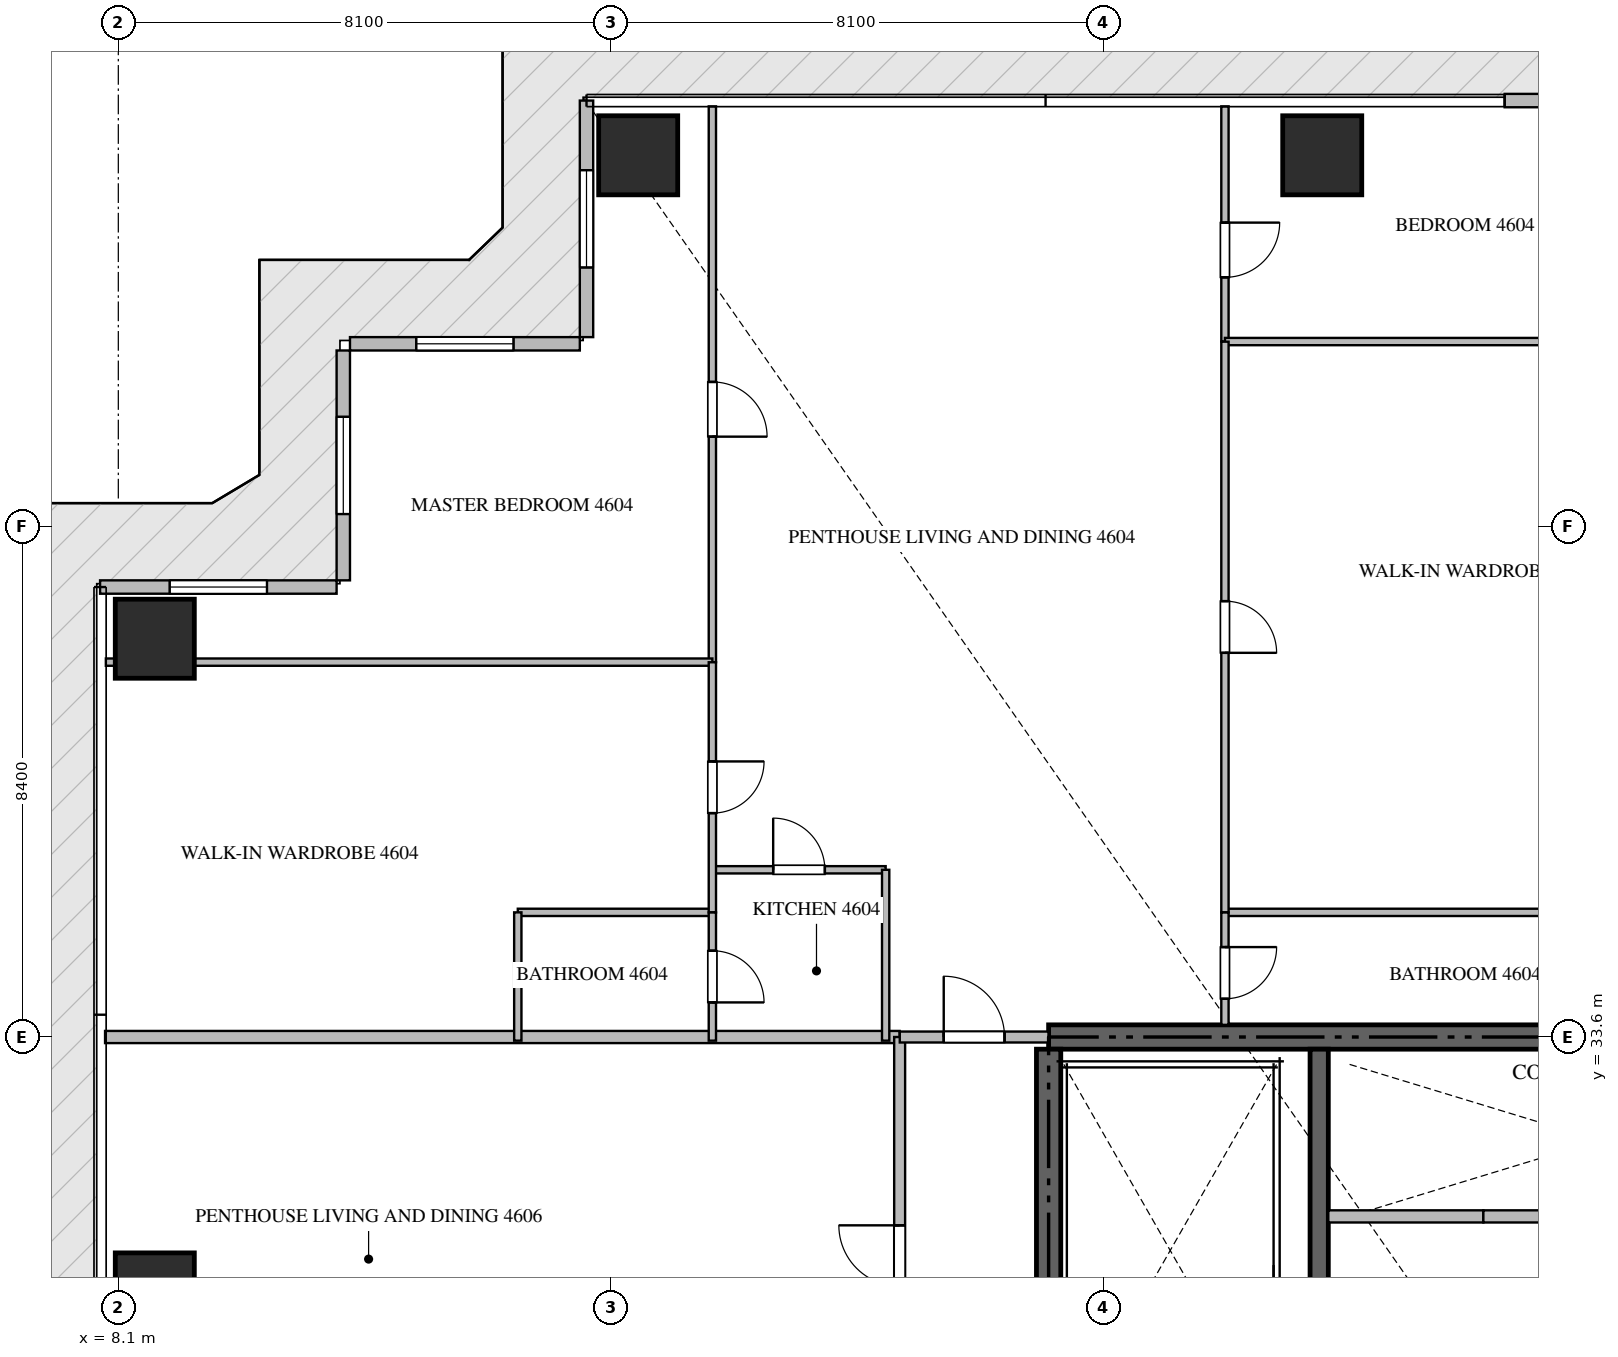
"""IFC4 building model, lengths in metres.
Left out: names, types, materials, properties, quantities, classifications, styles, units other than length and angle.
Written with IfcOpenShell. Run it as: python <this file> out.ifc"""

import sys

from ifc_helpers import new_model, si_unit, direction, frame, frame_2d, origin, origin_2d, place, context, subcontext, project, spatial, rectangle, extrude, source, transform, mapped, element, fill, save


model = new_model("IFC4")
c1 = context("Model", 3, precision=1e-05, world=origin(), true_north=direction((0.0, 1.0)))
c2 = subcontext(c1, "Body", "Model", "MODEL_VIEW")
j1 = project(units=[si_unit("LENGTHUNIT", "METRE"), si_unit("PLANEANGLEUNIT", "RADIAN")], contexts=[c1])
p1 = place(None, origin())
s1 = spatial("IfcSite", under=j1, at=p1, CompositionType="ELEMENT")
p2 = place(p1, origin())
s2 = spatial("IfcBuilding", under=s1, at=p2, CompositionType="ELEMENT")
p3 = place(p2, frame((0.0, 0.0, 183.9)))
s3 = spatial("IfcBuildingStorey", under=s2, at=p3, CompositionType="ELEMENT", Elevation=183.9)
p4 = place(p3, frame((41.4, 33.6, -0.26), z_axis=(0.0, 0.0, 1.0), x_axis=(-1.0, 0.0, 0.0)))
e1 = element("IfcWall", 1, at=p4, inside=s3, PredefinedType="SHEAR", context=c2, shape_type="SweptSolid", body=[
    extrude(rectangle(XDim=18.0, YDim=0.4, at=frame_2d((9.0, 0.0))), origin(), (0.0, 0.0, 1.0), 3.748),
])
p5 = place(p3, frame((23.4, 24.25, -0.26), z_axis=(0.0, 0.0, 1.0), x_axis=(0.0, 1.0, 0.0)))
e2 = element("IfcWall", 2, at=p5, inside=s3, PredefinedType="SHEAR", context=c2, shape_type="SweptSolid", body=[
    extrude(rectangle(XDim=9.15, YDim=0.4, at=frame_2d((4.575, 0.0))), origin(), (0.0, 0.0, 1.0), 3.748),
])
p6 = place(p3, frame((27.85, 23.55, -0.26), z_axis=(0.0, 0.0, 1.0), x_axis=(0.0, 1.0, 0.0)))
e3 = element("IfcWall", 3, at=p6, inside=s3, PredefinedType="SHEAR", context=c2, shape_type="SweptSolid", body=[
    extrude(rectangle(XDim=9.85, YDim=0.3, at=frame_2d((4.925, 0.0))), origin(), (0.0, 0.0, 1.0), 3.748),
])
m1 = source(origin(), c2, "Body", "SweptSolid", [
    extrude(rectangle(XDim=1.3, YDim=1.3, at=origin_2d()), origin(), (0.0, 0.0, 1.0), 3.75),
])
for number, where, z_axis, x_axis in (
    (4, (16.65, 48.1, -0.26), (0.0, 0.0, 1.0), (1.0, 0.0, 0.0)),
    (5, (27.9, 48.1, -0.26), (0.0, 0.0, 1.0), (1.0, 0.0, 0.0)),
    (6, (8.7, 29.4, -0.26), (0.0, 0.0, 1.0), (1.0, 0.0, 0.0)),
    (7, (8.7, 40.15, -0.26), (0.0, 0.0, 1.0), (1.0, 0.0, 0.0)),
):
    element("IfcColumn", number, at=place(p3, frame(where, z_axis=z_axis, x_axis=x_axis)), inside=s3, PredefinedType="COLUMN", context=c2, shape_type="MappedRepresentation", body=[
        mapped(m1, transform((0.0, 0.0, 0.0), scale=1.0)),
    ])
p7 = place(p3, frame((33.9, 49.0, 0.0), z_axis=(0.0, 0.0, 1.0), x_axis=(-1.0, 0.0, 0.0)))
e8 = element("IfcWall", 8, at=p7, inside=s3, PredefinedType="ELEMENTEDWALL", context=c2, shape_type="SweptSolid", body=[
    extrude(rectangle(XDim=3.0, YDim=0.22, at=frame_2d((1.5, 0.0))), origin(), (0.0, 0.0, 1.0), 3.475),
])
p8 = place(p7, frame((0.95, 0.0, 0.0)))
e9 = element("IfcOpeningElement", 9, at=p8, cuts=e8, PredefinedType="OPENING", context=c2, shape_type="SweptSolid", body=[
    extrude(rectangle(XDim=1.1, YDim=2.2, at=frame_2d((0.55, 1.1))), frame((0.0, 0.12, 0.0), z_axis=(0.0, -1.0, 0.0), x_axis=(1.0, 0.0, 0.0)), (0.0, 0.0, 1.0), 0.24),
])
p9 = place(p3, frame((15.8, 49.0, 0.0), z_axis=(0.0, 0.0, 1.0), x_axis=(0.0, -1.0, 0.0)))
e10 = element("IfcWall", 10, at=p9, inside=s3, PredefinedType="ELEMENTEDWALL", context=c2, shape_type="SweptSolid", body=[
    extrude(rectangle(XDim=3.89, YDim=0.22, at=frame_2d((1.945, 0.0))), origin(), (0.0, 0.0, 1.0), 3.475),
])
p10 = place(p9, frame((1.145, 0.0, 0.65)))
e11 = element("IfcOpeningElement", 11, at=p10, cuts=e10, PredefinedType="OPENING", context=c2, shape_type="SweptSolid", body=[
    extrude(rectangle(XDim=1.6, YDim=2.1, at=frame_2d((0.8, 1.05))), frame((0.0, 0.12, 0.0), z_axis=(0.0, -1.0, 0.0), x_axis=(1.0, 0.0, 0.0)), (0.0, 0.0, 1.0), 0.24),
])
p11 = place(p3, frame((15.69, 45.0, 0.0), z_axis=(0.0, 0.0, 1.0), x_axis=(-1.0, 0.0, 0.0)))
e12 = element("IfcWall", 12, at=p11, inside=s3, PredefinedType="ELEMENTEDWALL", context=c2, shape_type="SweptSolid", body=[
    extrude(rectangle(XDim=3.78, YDim=0.22, at=frame_2d((1.89, 0.0))), origin(), (0.0, 0.0, 1.0), 3.475),
])
p12 = place(p11, frame((1.09, 0.0, 0.65)))
e13 = element("IfcOpeningElement", 13, at=p12, cuts=e12, PredefinedType="OPENING", context=c2, shape_type="SweptSolid", body=[
    extrude(rectangle(XDim=1.6, YDim=2.1, at=frame_2d((0.8, 1.05))), frame((0.0, 0.12, 0.0), z_axis=(0.0, -1.0, 0.0), x_axis=(1.0, 0.0, 0.0)), (0.0, 0.0, 1.0), 0.24),
])
p13 = place(p3, frame((11.8, 44.89, 0.0), z_axis=(0.0, 0.0, 1.0), x_axis=(0.0, -1.0, 0.0)))
e14 = element("IfcWall", 14, at=p13, inside=s3, PredefinedType="ELEMENTEDWALL", context=c2, shape_type="SweptSolid", body=[
    extrude(rectangle(XDim=3.78, YDim=0.22, at=frame_2d((1.89, 0.0))), origin(), (0.0, 0.0, 1.0), 3.475),
])
p14 = place(p13, frame((1.09, 0.0, 0.65)))
e15 = element("IfcOpeningElement", 15, at=p14, cuts=e14, PredefinedType="OPENING", context=c2, shape_type="SweptSolid", body=[
    extrude(rectangle(XDim=1.6, YDim=2.1, at=frame_2d((0.8, 1.05))), frame((0.0, 0.12, 0.0), z_axis=(0.0, -1.0, 0.0), x_axis=(1.0, 0.0, 0.0)), (0.0, 0.0, 1.0), 0.24),
])
p15 = place(p3, frame((11.69, 41.0, 0.0), z_axis=(0.0, 0.0, 1.0), x_axis=(-1.0, 0.0, 0.0)))
e16 = element("IfcWall", 16, at=p15, inside=s3, PredefinedType="ELEMENTEDWALL", context=c2, shape_type="SweptSolid", body=[
    extrude(rectangle(XDim=3.89, YDim=0.22, at=frame_2d((1.945, 0.0))), origin(), (0.0, 0.0, 1.0), 3.475),
])
p16 = place(p15, frame((1.145, 0.0, 0.65)))
e17 = element("IfcOpeningElement", 17, at=p16, cuts=e16, PredefinedType="OPENING", context=c2, shape_type="SweptSolid", body=[
    extrude(rectangle(XDim=1.6, YDim=2.1, at=frame_2d((0.8, 1.05))), frame((0.0, 0.12, 0.0), z_axis=(0.0, -1.0, 0.0), x_axis=(1.0, 0.0, 0.0)), (0.0, 0.0, 1.0), 0.24),
])
p17 = place(p3, frame((28.0, 30.65, 0.0), z_axis=(0.0, 0.0, 1.0), x_axis=(1.0, 0.0, 0.0)))
e18 = element("IfcWall", 18, at=p17, inside=s3, PredefinedType="STANDARD", context=c2, shape_type="SweptSolid", body=[
    extrude(rectangle(XDim=2.55, YDim=0.2, at=frame_2d((1.275, 0.0))), origin(), (0.0, 0.0, 1.0), 3.49),
])
p18 = place(p3, frame((30.55, 30.65, 0.0), z_axis=(0.0, 0.0, 1.0), x_axis=(1.0, 0.0, 0.0)))
e19 = element("IfcWall", 19, at=p18, inside=s3, PredefinedType="STANDARD", context=c2, shape_type="SweptSolid", body=[
    extrude(rectangle(XDim=2.3, YDim=0.2, at=frame_2d((1.15, 0.0))), origin(), (0.0, 0.0, 1.0), 3.49),
])
p19 = place(p3, frame((7.882, 33.6, 0.0), z_axis=(0.0, 0.0, 1.0), x_axis=(1.0, 0.0, 0.0)))
e20 = element("IfcWall", 20, at=p19, inside=s3, PredefinedType="PARTITIONING", context=c2, shape_type="SweptSolid", body=[
    extrude(rectangle(XDim=13.068, YDim=0.2, at=frame_2d((6.534, 0.0))), origin(), (0.0, 0.0, 1.0), 3.49),
])
p20 = place(p3, frame((20.95, 14.9, 0.0), z_axis=(0.0, 0.0, 1.0), x_axis=(0.0, 1.0, 0.0)))
e21 = element("IfcWall", 21, at=p20, inside=s3, PredefinedType="PARTITIONING", context=c2, shape_type="SweptSolid", body=[
    extrude(rectangle(XDim=18.7, YDim=0.18, at=frame_2d((9.35, 0.0))), origin(), (0.0, 0.0, 1.0), 3.49),
])
p21 = place(p20, frame((14.603, 0.0, 0.0)))
e22 = element("IfcOpeningElement", 22, at=p21, cuts=e21, PredefinedType="OPENING", context=c2, shape_type="SweptSolid", body=[
    extrude(rectangle(XDim=1.0, YDim=2.15, at=frame_2d((0.5, 1.075))), frame((0.0, 0.1, 0.0), z_axis=(0.0, -1.0, 0.0), x_axis=(1.0, 0.0, 0.0)), (0.0, 0.0, 1.0), 0.2),
])
p22 = place(p3, frame((20.952, 33.6, 0.0), z_axis=(0.0, 0.0, 1.0), x_axis=(1.0, 0.0, 0.0)))
e23 = element("IfcWall", 23, at=p22, inside=s3, PredefinedType="PARTITIONING", context=c2, shape_type="SweptSolid", body=[
    extrude(rectangle(XDim=2.446, YDim=0.18, at=frame_2d((1.223, 0.0))), origin(), (0.0, 0.0, 1.0), 3.49),
])
p23 = place(p22, frame((0.723, 0.0, 0.0)))
e24 = element("IfcOpeningElement", 24, at=p23, cuts=e23, PredefinedType="OPENING", context=c2, shape_type="SweptSolid", body=[
    extrude(rectangle(XDim=1.0, YDim=2.15, at=frame_2d((0.5, 1.075))), frame((0.0, 0.1, 0.0), z_axis=(0.0, -1.0, 0.0), x_axis=(1.0, 0.0, 0.0)), (0.0, 0.0, 1.0), 0.2),
])
p24 = place(p3, frame((17.87, 36.35, 0.0), z_axis=(0.0, 0.0, 1.0), x_axis=(1.0, 0.0, 0.0)))
e25 = element("IfcWall", 25, at=p24, inside=s3, PredefinedType="PARTITIONING", context=c2, shape_type="SweptSolid", body=[
    extrude(rectangle(XDim=2.85, YDim=0.12, at=frame_2d((1.425, 0.0))), origin(), (0.0, 0.0, 1.0), 3.49),
])
p25 = place(p24, frame((1.0, 0.0, 0.0)))
e26 = element("IfcOpeningElement", 26, at=p25, cuts=e25, PredefinedType="OPENING", context=c2, shape_type="SweptSolid", body=[
    extrude(rectangle(XDim=0.85, YDim=2.1, at=frame_2d((0.425, 1.05))), frame((0.0, 0.07, 0.0), z_axis=(0.0, -1.0, 0.0), x_axis=(1.0, 0.0, 0.0)), (0.0, 0.0, 1.0), 0.14),
])
p26 = place(p3, frame((20.72, 36.35, 0.0), z_axis=(0.0, 0.0, 1.0), x_axis=(0.0, -1.0, 0.0)))
e27 = element("IfcWall", 27, at=p26, inside=s3, PredefinedType="PARTITIONING", context=c2, shape_type="SweptSolid", body=[
    extrude(rectangle(XDim=2.81, YDim=0.12, at=frame_2d((1.405, 0.0))), origin(), (0.0, 0.0, 1.0), 3.49),
])
p27 = place(p3, frame((17.87, 48.905, 0.0), z_axis=(0.0, 0.0, 1.0), x_axis=(0.0, -1.0, 0.0)))
e28 = element("IfcWall", 28, at=p27, inside=s3, PredefinedType="PARTITIONING", context=c2, shape_type="SweptSolid", body=[
    extrude(rectangle(XDim=9.14, YDim=0.12, at=frame_2d((4.57, 0.0))), origin(), (0.0, 0.0, 1.0), 3.49),
])
p28 = place(p27, frame((4.532, 0.0, 0.0)))
e29 = element("IfcOpeningElement", 29, at=p28, cuts=e28, PredefinedType="OPENING", context=c2, shape_type="SweptSolid", body=[
    extrude(rectangle(XDim=0.9, YDim=2.1, at=frame_2d((0.45, 1.05))), frame((0.0, 0.07, 0.0), z_axis=(0.0, -1.0, 0.0), x_axis=(1.0, 0.0, 0.0)), (0.0, 0.0, 1.0), 0.14),
])
p29 = place(p3, frame((7.895, 39.765, 0.0), z_axis=(0.0, 0.0, 1.0), x_axis=(1.0, 0.0, 0.0)))
e30 = element("IfcWall", 30, at=p29, inside=s3, PredefinedType="PARTITIONING", context=c2, shape_type="SweptSolid", body=[
    extrude(rectangle(XDim=9.975, YDim=0.12, at=frame_2d((4.988, 0.0))), origin(), (0.0, 0.0, 1.0), 3.49),
])
p30 = place(p3, frame((14.67, 35.65, 0.0), z_axis=(0.0, 0.0, 1.0), x_axis=(1.0, 0.0, 0.0)))
e31 = element("IfcWall", 31, at=p30, inside=s3, PredefinedType="PARTITIONING", context=c2, shape_type="SweptSolid", body=[
    extrude(rectangle(XDim=3.2, YDim=0.12, at=frame_2d((1.6, 0.0))), origin(), (0.0, 0.0, 1.0), 3.49),
])
p31 = place(p3, frame((14.67, 35.65, 0.0), z_axis=(0.0, 0.0, 1.0), x_axis=(0.0, -1.0, 0.0)))
e32 = element("IfcWall", 32, at=p31, inside=s3, PredefinedType="PARTITIONING", context=c2, shape_type="SweptSolid", body=[
    extrude(rectangle(XDim=2.11, YDim=0.12, at=frame_2d((1.055, 0.0))), origin(), (0.0, 0.0, 1.0), 3.49),
])
p32 = place(p3, frame((17.87, 39.763, 0.0), z_axis=(0.0, 0.0, 1.0), x_axis=(0.0, -1.0, 0.0)))
e33 = element("IfcWall", 33, at=p32, inside=s3, PredefinedType="PARTITIONING", context=c2, shape_type="SweptSolid", body=[
    extrude(rectangle(XDim=4.113, YDim=0.12, at=frame_2d((2.057, 0.0))), origin(), (0.0, 0.0, 1.0), 3.49),
])
p33 = place(p32, frame((1.631, 0.0, 0.0)))
e34 = element("IfcOpeningElement", 34, at=p33, cuts=e33, PredefinedType="OPENING", context=c2, shape_type="SweptSolid", body=[
    extrude(rectangle(XDim=0.85, YDim=2.1, at=frame_2d((0.425, 1.05))), frame((0.0, 0.07, 0.0), z_axis=(0.0, -1.0, 0.0), x_axis=(1.0, 0.0, 0.0)), (0.0, 0.0, 1.0), 0.14),
])
p34 = place(p3, frame((17.87, 35.648, 0.0), z_axis=(0.0, 0.0, 1.0), x_axis=(0.0, -1.0, 0.0)))
e35 = element("IfcWall", 35, at=p34, inside=s3, PredefinedType="PARTITIONING", context=c2, shape_type="SweptSolid", body=[
    extrude(rectangle(XDim=2.108, YDim=0.12, at=frame_2d((1.054, 0.0))), origin(), (0.0, 0.0, 1.0), 3.49),
])
p35 = place(p34, frame((0.629, 0.0, 0.0)))
e36 = element("IfcOpeningElement", 36, at=p35, cuts=e35, PredefinedType="OPENING", context=c2, shape_type="SweptSolid", body=[
    extrude(rectangle(XDim=0.85, YDim=2.1, at=frame_2d((0.425, 1.05))), frame((0.0, 0.07, 0.0), z_axis=(0.0, -1.0, 0.0), x_axis=(1.0, 0.0, 0.0)), (0.0, 0.0, 1.0), 0.14),
])
p36 = place(p3, frame((26.3, 48.905, 0.0), z_axis=(0.0, 0.0, 1.0), x_axis=(0.0, -1.0, 0.0)))
e37 = element("IfcWall", 37, at=p36, inside=s3, PredefinedType="PARTITIONING", context=c2, shape_type="SweptSolid", body=[
    extrude(rectangle(XDim=3.868, YDim=0.12, at=frame_2d((1.934, 0.0))), origin(), (0.0, 0.0, 1.0), 3.49),
])
p37 = place(p36, frame((1.912, 0.0, 0.0)))
e38 = element("IfcOpeningElement", 38, at=p37, cuts=e37, PredefinedType="OPENING", context=c2, shape_type="SweptSolid", body=[
    extrude(rectangle(XDim=0.9, YDim=2.1, at=frame_2d((0.45, 1.05))), frame((0.0, 0.07, 0.0), z_axis=(0.0, -1.0, 0.0), x_axis=(1.0, 0.0, 0.0)), (0.0, 0.0, 1.0), 0.14),
])
for number, where, z_axis, x_axis in (
    (39, (26.3, 45.037, 0.0), (0.0, 0.0, 1.0), (1.0, 0.0, 0.0)),
    (40, (26.3, 35.65, 0.0), (0.0, 0.0, 1.0), (1.0, 0.0, 0.0)),
):
    element("IfcWall", number, at=place(p3, frame(where, z_axis=z_axis, x_axis=x_axis)), inside=s3, PredefinedType="PARTITIONING", context=c2, shape_type="SweptSolid", body=[
        extrude(rectangle(XDim=7.96, YDim=0.12, at=frame_2d((3.98, 0.0))), origin(), (0.0, 0.0, 1.0), 3.49),
    ])
p38 = place(p3, frame((26.3, 45.035, 0.0), z_axis=(0.0, 0.0, 1.0), x_axis=(0.0, -1.0, 0.0)))
e41 = element("IfcWall", 41, at=p38, inside=s3, PredefinedType="PARTITIONING", context=c2, shape_type="SweptSolid", body=[
    extrude(rectangle(XDim=9.385, YDim=0.12, at=frame_2d((4.692, 0.0))), origin(), (0.0, 0.0, 1.0), 3.49),
])
p39 = place(p38, frame((4.267, 0.0, 0.0)))
e42 = element("IfcOpeningElement", 42, at=p39, cuts=e41, PredefinedType="OPENING", context=c2, shape_type="SweptSolid", body=[
    extrude(rectangle(XDim=0.85, YDim=2.1, at=frame_2d((0.425, 1.05))), frame((0.0, 0.07, 0.0), z_axis=(0.0, -1.0, 0.0), x_axis=(1.0, 0.0, 0.0)), (0.0, 0.0, 1.0), 0.14),
])
p40 = place(p3, frame((26.3, 35.648, 0.0), z_axis=(0.0, 0.0, 1.0), x_axis=(0.0, -1.0, 0.0)))
e43 = element("IfcWall", 43, at=p40, inside=s3, PredefinedType="PARTITIONING", context=c2, shape_type="SweptSolid", body=[
    extrude(rectangle(XDim=1.848, YDim=0.12, at=frame_2d((0.924, 0.0))), origin(), (0.0, 0.0, 1.0), 3.49),
])
p41 = place(p40, frame((0.569, 0.0, 0.0)))
e44 = element("IfcOpeningElement", 44, at=p41, cuts=e43, PredefinedType="OPENING", context=c2, shape_type="SweptSolid", body=[
    extrude(rectangle(XDim=0.85, YDim=2.1, at=frame_2d((0.425, 1.05))), frame((0.0, 0.07, 0.0), z_axis=(0.0, -1.0, 0.0), x_axis=(1.0, 0.0, 0.0)), (0.0, 0.0, 1.0), 0.14),
])
m2 = source(origin(), c2, "Body", "SweptSolid", [
    extrude(rectangle(XDim=1.6, YDim=2.1, at=frame_2d((0.8, 1.05))), frame((0.0, 0.03, 0.0), z_axis=(0.0, -1.0, 0.0), x_axis=(1.0, 0.0, 0.0)), (0.0, 0.0, 1.0), 0.06),
])
p42 = place(p10, origin())
e45 = element("IfcWindow", 45, at=p42, inside=s3, PartitioningType="SINGLE_PANEL", PredefinedType="WINDOW", context=c2, shape_type="MappedRepresentation", body=[
    mapped(m2, transform((0.0, 0.0, 0.0), scale=1.0)),
])
fill(e11, e45)
p43 = place(p12, origin())
e46 = element("IfcWindow", 46, at=p43, inside=s3, PartitioningType="SINGLE_PANEL", PredefinedType="WINDOW", context=c2, shape_type="MappedRepresentation", body=[
    mapped(m2, transform((0.0, 0.0, 0.0), scale=1.0)),
])
fill(e13, e46)
p44 = place(p14, origin())
e47 = element("IfcWindow", 47, at=p44, inside=s3, PartitioningType="SINGLE_PANEL", PredefinedType="WINDOW", context=c2, shape_type="MappedRepresentation", body=[
    mapped(m2, transform((0.0, 0.0, 0.0), scale=1.0)),
])
fill(e15, e47)
p45 = place(p16, origin())
e48 = element("IfcWindow", 48, at=p45, inside=s3, PartitioningType="SINGLE_PANEL", PredefinedType="WINDOW", context=c2, shape_type="MappedRepresentation", body=[
    mapped(m2, transform((0.0, 0.0, 0.0), scale=1.0)),
])
fill(e17, e48)
m3 = source(origin(), c2, "Body", "SweptSolid", [
    extrude(rectangle(XDim=1.0, YDim=2.15, at=frame_2d((0.5, 1.075))), frame((0.0, 0.025, 0.0), z_axis=(0.0, -1.0, 0.0), x_axis=(1.0, 0.0, 0.0)), (0.0, 0.0, 1.0), 0.05),
])
p46 = place(p21, origin())
e49 = element("IfcDoor", 49, at=p46, inside=s3, OperationType="SINGLE_SWING_RIGHT", PredefinedType="DOOR", context=c2, shape_type="MappedRepresentation", body=[
    mapped(m3, transform((0.0, 0.0, 0.0), scale=1.0)),
])
fill(e22, e49)
p47 = place(p23, origin())
e50 = element("IfcDoor", 50, at=p47, inside=s3, OperationType="SINGLE_SWING_LEFT", PredefinedType="DOOR", context=c2, shape_type="MappedRepresentation", body=[
    mapped(m3, transform((0.0, 0.0, 0.0), scale=1.0)),
])
fill(e24, e50)
m4 = source(origin(), c2, "Body", "SweptSolid", [
    extrude(rectangle(XDim=0.85, YDim=2.1, at=frame_2d((0.425, 1.05))), frame((0.0, 0.025, 0.0), z_axis=(0.0, -1.0, 0.0), x_axis=(1.0, 0.0, 0.0)), (0.0, 0.0, 1.0), 0.05),
])
p48 = place(p25, origin())
e51 = element("IfcDoor", 51, at=p48, inside=s3, OperationType="SINGLE_SWING_LEFT", PredefinedType="DOOR", context=c2, shape_type="MappedRepresentation", body=[
    mapped(m4, transform((0.0, 0.0, 0.0), scale=1.0)),
])
fill(e26, e51)
m5 = source(origin(), c2, "Body", "SweptSolid", [
    extrude(rectangle(XDim=0.9, YDim=2.1, at=frame_2d((0.45, 1.05))), frame((0.0, 0.025, 0.0), z_axis=(0.0, -1.0, 0.0), x_axis=(1.0, 0.0, 0.0)), (0.0, 0.0, 1.0), 0.05),
])
p49 = place(p28, origin())
e52 = element("IfcDoor", 52, at=p49, inside=s3, OperationType="SINGLE_SWING_RIGHT", PredefinedType="DOOR", context=c2, shape_type="MappedRepresentation", body=[
    mapped(m5, transform((0.0, 0.0, 0.0), scale=1.0)),
])
fill(e29, e52)
p50 = place(p33, origin())
e53 = element("IfcDoor", 53, at=p50, inside=s3, OperationType="SINGLE_SWING_LEFT", PredefinedType="DOOR", context=c2, shape_type="MappedRepresentation", body=[
    mapped(m4, transform((0.0, 0.0, 0.0), scale=1.0)),
])
fill(e34, e53)
p51 = place(p35, origin())
e54 = element("IfcDoor", 54, at=p51, inside=s3, OperationType="SINGLE_SWING_RIGHT", PredefinedType="DOOR", context=c2, shape_type="MappedRepresentation", body=[
    mapped(m4, transform((0.0, 0.0, 0.0), scale=1.0)),
])
fill(e36, e54)
p52 = place(p37, origin())
e55 = element("IfcDoor", 55, at=p52, inside=s3, OperationType="SINGLE_SWING_LEFT", PredefinedType="DOOR", context=c2, shape_type="MappedRepresentation", body=[
    mapped(m5, transform((0.0, 0.0, 0.0), scale=1.0)),
])
fill(e38, e55)
p53 = place(p39, origin())
e56 = element("IfcDoor", 56, at=p53, inside=s3, OperationType="SINGLE_SWING_RIGHT", PredefinedType="DOOR", context=c2, shape_type="MappedRepresentation", body=[
    mapped(m4, transform((0.0, 0.0, 0.0), scale=1.0)),
])
fill(e42, e56)
p54 = place(p41, origin())
e57 = element("IfcDoor", 57, at=p54, inside=s3, OperationType="SINGLE_SWING_LEFT", PredefinedType="DOOR", context=c2, shape_type="MappedRepresentation", body=[
    mapped(m4, transform((0.0, 0.0, 0.0), scale=1.0)),
])
fill(e44, e57)
save(model, sys.argv[1])
